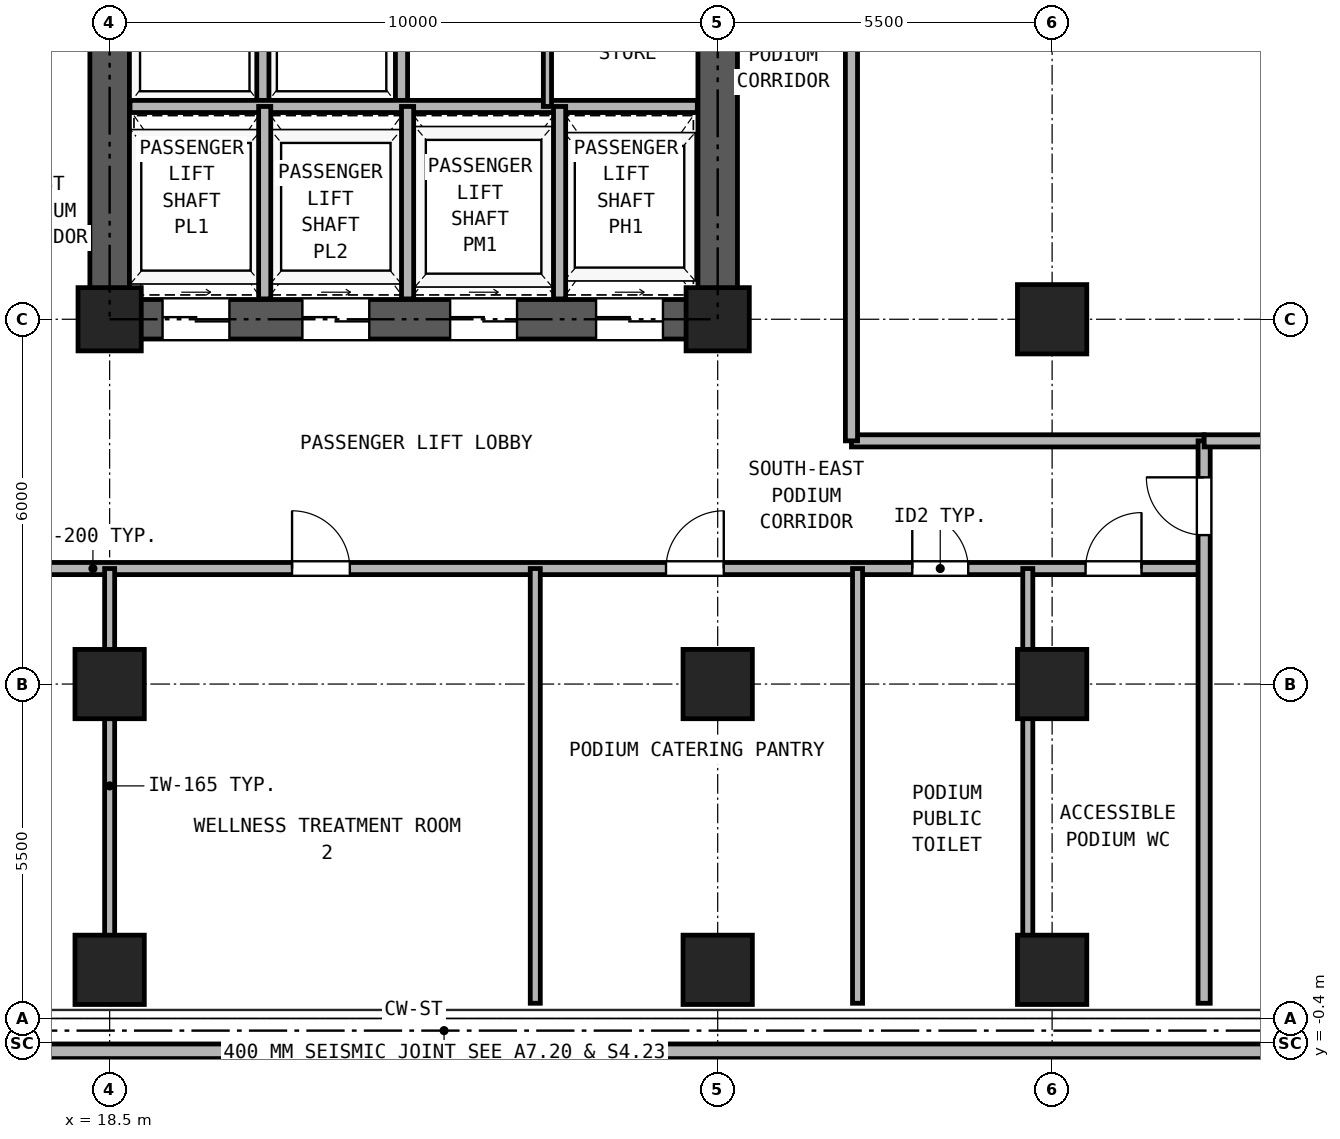
"""IFC4 building model, lengths in metres.
Left out: names, types, materials, properties, quantities, classifications, styles, units other than length and angle.
Written with IfcOpenShell. Run it as: python <this file> out.ifc"""

import sys

from ifc_helpers import new_model, si_unit, direction, frame, frame_2d, origin, origin_2d, place, context, subcontext, project, spatial, rectangle, hollow_rectangle, extrude, source, transform, mapped, element, fill, save


model = new_model("IFC4")
c1 = context("Model", 3, precision=1e-05, world=origin(), true_north=direction((0.0, 1.0)))
c2 = subcontext(c1, "Body", "Model", "MODEL_VIEW")
j1 = project(units=[si_unit("LENGTHUNIT", "METRE"), si_unit("PLANEANGLEUNIT", "RADIAN")], contexts=[c1])
p1 = place(None, origin())
s1 = spatial("IfcSite", under=j1, at=p1, CompositionType="ELEMENT")
p2 = place(p1, origin())
s2 = spatial("IfcBuilding", under=s1, at=p2, CompositionType="ELEMENT")
p3 = place(p2, frame((0.0, 0.0, 13.5)))
s3 = spatial("IfcBuildingStorey", under=s2, at=p3, CompositionType="ELEMENT", Elevation=13.5)
m1 = source(origin(), c2, "Body", "SweptSolid", [
    extrude(hollow_rectangle(XDim=1.14, YDim=1.14, WallThickness=0.07, at=origin_2d()), origin(), (0.0, 0.0, 1.0), 4.18),
])
for number, where, z_axis, x_axis in (
    (1, (18.5, 0.8, 0.0), (0.0, 0.0, 1.0), (1.0, 0.0, 0.0)),
    (2, (28.5, 0.8, 0.0), (0.0, 0.0, 1.0), (1.0, 0.0, 0.0)),
    (3, (34.0, 0.8, 0.0), (0.0, 0.0, 1.0), (1.0, 0.0, 0.0)),
    (4, (18.5, 5.5, 0.0), (0.0, 0.0, 1.0), (1.0, 0.0, 0.0)),
):
    element("IfcColumn", number, at=place(p3, frame(where, z_axis=z_axis, x_axis=x_axis)), inside=s3, PredefinedType="COLUMN", context=c2, shape_type="MappedRepresentation", body=[
        mapped(m1, transform((0.0, 0.0, 0.0), x_axis=(1.0, 0.0, 0.0), y_axis=(0.0, 1.0, 0.0), z_axis=(0.0, 0.0, 1.0), scale=1.0)),
    ])
m2 = source(origin(), c2, "Body", "SweptSolid", [
    extrude(hollow_rectangle(XDim=1.04, YDim=1.04, WallThickness=0.065, at=origin_2d()), origin(), (0.0, 0.0, 1.0), 4.18),
])
p4 = place(p3, frame((18.5, 11.5, 0.0), z_axis=(0.0, 0.0, 1.0), x_axis=(1.0, 0.0, 0.0)))
e5 = element("IfcColumn", 5, at=p4, inside=s3, PredefinedType="COLUMN", context=c2, shape_type="MappedRepresentation", body=[
    mapped(m2, transform((0.0, 0.0, 0.0), x_axis=(1.0, 0.0, 0.0), y_axis=(0.0, 1.0, 0.0), z_axis=(0.0, 0.0, 1.0), scale=1.0)),
])
p5 = place(p3, frame((28.5, 5.5, 0.0), z_axis=(0.0, 0.0, 1.0), x_axis=(1.0, 0.0, 0.0)))
e6 = element("IfcColumn", 6, at=p5, inside=s3, PredefinedType="COLUMN", context=c2, shape_type="MappedRepresentation", body=[
    mapped(m1, transform((0.0, 0.0, 0.0), x_axis=(1.0, 0.0, 0.0), y_axis=(0.0, 1.0, 0.0), z_axis=(0.0, 0.0, 1.0), scale=1.0)),
])
p6 = place(p3, frame((28.5, 11.5, 0.0), z_axis=(0.0, 0.0, 1.0), x_axis=(1.0, 0.0, 0.0)))
e7 = element("IfcColumn", 7, at=p6, inside=s3, PredefinedType="COLUMN", context=c2, shape_type="MappedRepresentation", body=[
    mapped(m2, transform((0.0, 0.0, 0.0), x_axis=(1.0, 0.0, 0.0), y_axis=(0.0, 1.0, 0.0), z_axis=(0.0, 0.0, 1.0), scale=1.0)),
])
for number, where, z_axis, x_axis in (
    (8, (34.0, 5.5, 0.0), (0.0, 0.0, 1.0), (1.0, 0.0, 0.0)),
    (9, (34.0, 11.5, 0.0), (0.0, 0.0, 1.0), (1.0, 0.0, 0.0)),
):
    element("IfcColumn", number, at=place(p3, frame(where, z_axis=z_axis, x_axis=x_axis)), inside=s3, PredefinedType="COLUMN", context=c2, shape_type="MappedRepresentation", body=[
        mapped(m1, transform((0.0, 0.0, 0.0), x_axis=(1.0, 0.0, 0.0), y_axis=(0.0, 1.0, 0.0), z_axis=(0.0, 0.0, 1.0), scale=1.0)),
    ])
p7 = place(p3, frame((0.2, -0.54, 0.0), z_axis=(0.0, 0.0, 1.0), x_axis=(1.0, 0.0, 0.0)))
e10 = element("IfcWall", 10, at=p7, inside=s3, PredefinedType="SOLIDWALL", context=c2, shape_type="SweptSolid", body=[
    extrude(rectangle(XDim=47.34, YDim=0.24, at=frame_2d((23.67, 0.0))), origin(), (0.0, 0.0, 1.0), 4.18),
])
p8 = place(p3, frame((18.175, 11.5, 0.0), z_axis=(0.0, 0.0, 1.0), x_axis=(1.0, 0.0, 0.0)))
e11 = element("IfcWall", 11, at=p8, inside=s3, PredefinedType="SHEAR", context=c2, shape_type="SweptSolid", body=[
    extrude(rectangle(XDim=10.65, YDim=0.65, at=frame_2d((5.325, 0.0))), origin(), (0.0, 0.0, 1.0), 4.18),
])
p9 = place(p8, frame((1.195, 0.0, 0.0)))
e12 = element("IfcOpeningElement", 12, at=p9, cuts=e11, PredefinedType="OPENING", context=c2, shape_type="SweptSolid", body=[
    extrude(rectangle(XDim=1.1, YDim=2.25, at=frame_2d((0.55, 1.125))), frame((0.0, 0.335, 0.0), z_axis=(0.0, -1.0, 0.0), x_axis=(1.0, 0.0, 0.0)), (0.0, 0.0, 1.0), 0.67),
])
p10 = place(p8, frame((3.495, 0.0, 0.0)))
e13 = element("IfcOpeningElement", 13, at=p10, cuts=e11, PredefinedType="OPENING", context=c2, shape_type="SweptSolid", body=[
    extrude(rectangle(XDim=1.1, YDim=2.25, at=frame_2d((0.55, 1.125))), frame((0.0, 0.335, 0.0), z_axis=(0.0, -1.0, 0.0), x_axis=(1.0, 0.0, 0.0)), (0.0, 0.0, 1.0), 0.67),
])
p11 = place(p8, frame((5.925, 0.0, 0.0)))
e14 = element("IfcOpeningElement", 14, at=p11, cuts=e11, PredefinedType="OPENING", context=c2, shape_type="SweptSolid", body=[
    extrude(rectangle(XDim=1.1, YDim=2.25, at=frame_2d((0.55, 1.125))), frame((0.0, 0.335, 0.0), z_axis=(0.0, -1.0, 0.0), x_axis=(1.0, 0.0, 0.0)), (0.0, 0.0, 1.0), 0.67),
])
p12 = place(p8, frame((8.325, 0.0, 0.0)))
e15 = element("IfcOpeningElement", 15, at=p12, cuts=e11, PredefinedType="OPENING", context=c2, shape_type="SweptSolid", body=[
    extrude(rectangle(XDim=1.1, YDim=2.25, at=frame_2d((0.55, 1.125))), frame((0.0, 0.335, 0.0), z_axis=(0.0, -1.0, 0.0), x_axis=(1.0, 0.0, 0.0)), (0.0, 0.0, 1.0), 0.67),
])
p13 = place(p3, frame((18.5, 11.825, 0.0), z_axis=(0.0, 0.0, 1.0), x_axis=(0.0, 1.0, 0.0)))
e16 = element("IfcWall", 16, at=p13, inside=s3, PredefinedType="SHEAR", context=c2, shape_type="SweptSolid", body=[
    extrude(rectangle(XDim=16.6, YDim=0.65, at=frame_2d((8.3, 0.0))), origin(), (0.0, 0.0, 1.0), 4.18),
])
p14 = place(p13, frame((7.325, 0.0, 0.0)))
e17 = element("IfcOpeningElement", 17, at=p14, cuts=e16, PredefinedType="OPENING", context=c2, shape_type="SweptSolid", body=[
    extrude(rectangle(XDim=1.15, YDim=2.2, at=frame_2d((0.575, 1.1))), frame((0.0, 0.335, 0.0), z_axis=(0.0, -1.0, 0.0), x_axis=(1.0, 0.0, 0.0)), (0.0, 0.0, 1.0), 0.67),
])
p15 = place(p3, frame((28.5, 11.825, 0.0), z_axis=(0.0, 0.0, 1.0), x_axis=(0.0, 1.0, 0.0)))
e18 = element("IfcWall", 18, at=p15, inside=s3, PredefinedType="SHEAR", context=c2, shape_type="SweptSolid", body=[
    extrude(rectangle(XDim=16.6, YDim=0.65, at=frame_2d((8.3, 0.0))), origin(), (0.0, 0.0, 1.0), 4.18),
])
p16 = place(p15, frame((7.325, 0.0, 0.0)))
e19 = element("IfcOpeningElement", 19, at=p16, cuts=e18, PredefinedType="OPENING", context=c2, shape_type="SweptSolid", body=[
    extrude(rectangle(XDim=1.15, YDim=2.2, at=frame_2d((0.575, 1.1))), frame((0.0, 0.335, 0.0), z_axis=(0.0, -1.0, 0.0), x_axis=(1.0, 0.0, 0.0)), (0.0, 0.0, 1.0), 0.67),
])
for number, where, z_axis, x_axis in (
    (20, (21.02, 15.0, 0.0), (0.0, 0.0, 1.0), (0.0, 1.0, 0.0)),
    (21, (23.3, 15.0, 0.0), (0.0, 0.0, 1.0), (0.0, 1.0, 0.0)),
):
    element("IfcWall", number, at=place(p3, frame(where, z_axis=z_axis, x_axis=x_axis)), inside=s3, PredefinedType="PARTITIONING", context=c2, shape_type="SweptSolid", body=[
        extrude(rectangle(XDim=3.0, YDim=0.2, at=frame_2d((1.5, 0.0))), origin(), (0.0, 0.0, 1.0), 4.18),
    ])
p17 = place(p3, frame((18.835, 15.0, 0.0), z_axis=(0.0, 0.0, 1.0), x_axis=(1.0, 0.0, 0.0)))
e22 = element("IfcWall", 22, at=p17, inside=s3, PredefinedType="PARTITIONING", context=c2, shape_type="SweptSolid", body=[
    extrude(rectangle(XDim=9.33, YDim=0.2, at=frame_2d((4.665, 0.0))), origin(), (0.0, 0.0, 1.0), 4.18),
])
p18 = place(p3, frame((25.7, 15.0, 0.0), z_axis=(0.0, 0.0, 1.0), x_axis=(0.0, 1.0, 0.0)))
e23 = element("IfcWall", 23, at=p18, inside=s3, PredefinedType="PARTITIONING", context=c2, shape_type="SweptSolid", body=[
    extrude(rectangle(XDim=3.0, YDim=0.135, at=frame_2d((1.5, 0.0))), origin(), (0.0, 0.0, 1.0), 4.18),
])
for number, where, z_axis, x_axis in (
    (24, (21.05, 11.835, 0.0), (0.0, 0.0, 1.0), (0.0, 1.0, 0.0)),
    (25, (23.4, 11.835, 0.0), (0.0, 0.0, 1.0), (0.0, 1.0, 0.0)),
    (26, (25.9, 11.835, 0.0), (0.0, 0.0, 1.0), (0.0, 1.0, 0.0)),
):
    element("IfcWall", number, at=place(p3, frame(where, z_axis=z_axis, x_axis=x_axis)), inside=s3, PredefinedType="PARTITIONING", context=c2, shape_type="SweptSolid", body=[
        extrude(rectangle(XDim=3.165, YDim=0.2, at=frame_2d((1.583, 0.0))), origin(), (0.0, 0.0, 1.0), 4.18),
    ])
p19 = place(p3, frame((10.5, 7.4, 0.0), z_axis=(0.0, 0.0, 1.0), x_axis=(1.0, 0.0, 0.0)))
e27 = element("IfcWall", 27, at=p19, inside=s3, PredefinedType="PARTITIONING", context=c2, shape_type="SweptSolid", body=[
    extrude(rectangle(XDim=26.0, YDim=0.2, at=frame_2d((13.0, 0.0))), origin(), (0.0, 0.0, 1.0), 4.18),
])
p20 = place(p19, frame((3.5, 0.0, 0.0)))
e28 = element("IfcOpeningElement", 28, at=p20, cuts=e27, PredefinedType="OPENING", context=c2, shape_type="SweptSolid", body=[
    extrude(rectangle(XDim=0.95, YDim=2.15, at=frame_2d((0.475, 1.075))), frame((0.0, 0.11, 0.0), z_axis=(0.0, -1.0, 0.0), x_axis=(1.0, 0.0, 0.0)), (0.0, 0.0, 1.0), 0.22),
])
p21 = place(p19, frame((11.0, 0.0, 0.0)))
e29 = element("IfcOpeningElement", 29, at=p21, cuts=e27, PredefinedType="OPENING", context=c2, shape_type="SweptSolid", body=[
    extrude(rectangle(XDim=0.95, YDim=2.15, at=frame_2d((0.475, 1.075))), frame((0.0, 0.11, 0.0), z_axis=(0.0, -1.0, 0.0), x_axis=(1.0, 0.0, 0.0)), (0.0, 0.0, 1.0), 0.22),
])
p22 = place(p19, frame((17.15, 0.0, 0.0)))
e30 = element("IfcOpeningElement", 30, at=p22, cuts=e27, PredefinedType="OPENING", context=c2, shape_type="SweptSolid", body=[
    extrude(rectangle(XDim=0.95, YDim=2.15, at=frame_2d((0.475, 1.075))), frame((0.0, 0.11, 0.0), z_axis=(0.0, -1.0, 0.0), x_axis=(1.0, 0.0, 0.0)), (0.0, 0.0, 1.0), 0.22),
])
p23 = place(p19, frame((21.2, 0.0, 0.0)))
e31 = element("IfcOpeningElement", 31, at=p23, cuts=e27, PredefinedType="OPENING", context=c2, shape_type="SweptSolid", body=[
    extrude(rectangle(XDim=0.92, YDim=2.1, at=frame_2d((0.46, 1.05))), frame((0.0, 0.11, 0.0), z_axis=(0.0, -1.0, 0.0), x_axis=(1.0, 0.0, 0.0)), (0.0, 0.0, 1.0), 0.22),
])
p24 = place(p19, frame((24.05, 0.0, 0.0)))
e32 = element("IfcOpeningElement", 32, at=p24, cuts=e27, PredefinedType="OPENING", context=c2, shape_type="SweptSolid", body=[
    extrude(rectangle(XDim=0.92, YDim=2.1, at=frame_2d((0.46, 1.05))), frame((0.0, 0.11, 0.0), z_axis=(0.0, -1.0, 0.0), x_axis=(1.0, 0.0, 0.0)), (0.0, 0.0, 1.0), 0.22),
])
p25 = place(p3, frame((30.7, 9.5, 0.0), z_axis=(0.0, 0.0, 1.0), x_axis=(1.0, 0.0, 0.0)))
e33 = element("IfcWall", 33, at=p25, inside=s3, PredefinedType="PARTITIONING", context=c2, shape_type="SweptSolid", body=[
    extrude(rectangle(XDim=5.8, YDim=0.2, at=frame_2d((2.9, 0.0))), origin(), (0.0, 0.0, 1.0), 4.18),
])
p26 = place(p3, frame((30.7, 9.5, 0.0), z_axis=(0.0, 0.0, 1.0), x_axis=(0.0, 1.0, 0.0)))
e34 = element("IfcWall", 34, at=p26, inside=s3, PredefinedType="PARTITIONING", context=c2, shape_type="SweptSolid", body=[
    extrude(rectangle(XDim=20.7, YDim=0.2, at=frame_2d((10.35, 0.0))), origin(), (0.0, 0.0, 1.0), 4.18),
])
p27 = place(p26, frame((9.85, 0.0, 0.0)))
e35 = element("IfcOpeningElement", 35, at=p27, cuts=e34, PredefinedType="OPENING", context=c2, shape_type="SweptSolid", body=[
    extrude(rectangle(XDim=0.95, YDim=2.15, at=frame_2d((0.475, 1.075))), frame((0.0, 0.11, 0.0), z_axis=(0.0, -1.0, 0.0), x_axis=(1.0, 0.0, 0.0)), (0.0, 0.0, 1.0), 0.22),
])
p28 = place(p3, frame((36.5, 0.25, 0.0), z_axis=(0.0, 0.0, 1.0), x_axis=(0.0, 1.0, 0.0)))
e36 = element("IfcWall", 36, at=p28, inside=s3, PredefinedType="PARTITIONING", context=c2, shape_type="SweptSolid", body=[
    extrude(rectangle(XDim=9.25, YDim=0.2, at=frame_2d((4.625, 0.0))), origin(), (0.0, 0.0, 1.0), 4.18),
])
p29 = place(p28, frame((7.7, 0.0, 0.0)))
e37 = element("IfcOpeningElement", 37, at=p29, cuts=e36, PredefinedType="OPENING", context=c2, shape_type="SweptSolid", body=[
    extrude(rectangle(XDim=0.95, YDim=2.15, at=frame_2d((0.475, 1.075))), frame((0.0, 0.11, 0.0), z_axis=(0.0, -1.0, 0.0), x_axis=(1.0, 0.0, 0.0)), (0.0, 0.0, 1.0), 0.22),
])
p30 = place(p3, frame((36.5, 9.5, 0.0), z_axis=(0.0, 0.0, 1.0), x_axis=(1.0, 0.0, 0.0)))
e38 = element("IfcWall", 38, at=p30, inside=s3, PredefinedType="PARTITIONING", context=c2, shape_type="SweptSolid", body=[
    extrude(rectangle(XDim=10.25, YDim=0.2, at=frame_2d((5.125, 0.0))), origin(), (0.0, 0.0, 1.0), 4.18),
])
p31 = place(p3, frame((18.5, 0.25, 0.0), z_axis=(0.0, 0.0, 1.0), x_axis=(0.0, 1.0, 0.0)))
e39 = element("IfcWall", 39, at=p31, inside=s3, PredefinedType="PARTITIONING", context=c2, shape_type="SweptSolid", body=[
    extrude(rectangle(XDim=7.15, YDim=0.165, at=frame_2d((3.575, 0.0))), origin(), (0.0, 0.0, 1.0), 3.253),
])
for number, where, z_axis, x_axis in (
    (40, (25.5, 0.25, 0.0), (0.0, 0.0, 1.0), (0.0, 1.0, 0.0)),
    (41, (30.8, 0.25, 0.0), (0.0, 0.0, 1.0), (0.0, 1.0, 0.0)),
    (42, (33.6, 0.25, 0.0), (0.0, 0.0, 1.0), (0.0, 1.0, 0.0)),
):
    element("IfcWall", number, at=place(p3, frame(where, z_axis=z_axis, x_axis=x_axis)), inside=s3, PredefinedType="PARTITIONING", context=c2, shape_type="SweptSolid", body=[
        extrude(rectangle(XDim=7.15, YDim=0.165, at=frame_2d((3.575, 0.0))), origin(), (0.0, 0.0, 1.0), 4.18),
    ])
p32 = place(p9, frame((1.1, 0.0, 0.0), z_axis=(0.0, 0.0, 1.0), x_axis=(-1.0, 0.0, 0.0)))
e43 = element("IfcDoor", 43, at=p32, inside=s3, OperationType="DOUBLE_DOOR_SLIDING", PredefinedType="DOOR", context=c2, shape_type="SweptSolid", body=[
    extrude(rectangle(XDim=1.1, YDim=2.25, at=frame_2d((0.55, 1.125))), frame((0.0, 0.025, 0.0), z_axis=(0.0, -1.0, 0.0), x_axis=(1.0, 0.0, 0.0)), (0.0, 0.0, 1.0), 0.05),
])
fill(e12, e43)
p33 = place(p10, frame((1.1, 0.0, 0.0), z_axis=(0.0, 0.0, 1.0), x_axis=(-1.0, 0.0, 0.0)))
e44 = element("IfcDoor", 44, at=p33, inside=s3, OperationType="DOUBLE_DOOR_SLIDING", PredefinedType="DOOR", context=c2, shape_type="SweptSolid", body=[
    extrude(rectangle(XDim=1.1, YDim=2.25, at=frame_2d((0.55, 1.125))), frame((0.0, 0.025, 0.0), z_axis=(0.0, -1.0, 0.0), x_axis=(1.0, 0.0, 0.0)), (0.0, 0.0, 1.0), 0.05),
])
fill(e13, e44)
p34 = place(p11, frame((1.1, 0.0, 0.0), z_axis=(0.0, 0.0, 1.0), x_axis=(-1.0, 0.0, 0.0)))
e45 = element("IfcDoor", 45, at=p34, inside=s3, OperationType="DOUBLE_DOOR_SLIDING", PredefinedType="DOOR", context=c2, shape_type="SweptSolid", body=[
    extrude(rectangle(XDim=1.1, YDim=2.25, at=frame_2d((0.55, 1.125))), frame((0.0, 0.025, 0.0), z_axis=(0.0, -1.0, 0.0), x_axis=(1.0, 0.0, 0.0)), (0.0, 0.0, 1.0), 0.05),
])
fill(e14, e45)
p35 = place(p12, frame((1.1, 0.0, 0.0), z_axis=(0.0, 0.0, 1.0), x_axis=(-1.0, 0.0, 0.0)))
e46 = element("IfcDoor", 46, at=p35, inside=s3, OperationType="DOUBLE_DOOR_SLIDING", PredefinedType="DOOR", context=c2, shape_type="SweptSolid", body=[
    extrude(rectangle(XDim=1.1, YDim=2.25, at=frame_2d((0.55, 1.125))), frame((0.0, 0.025, 0.0), z_axis=(0.0, -1.0, 0.0), x_axis=(1.0, 0.0, 0.0)), (0.0, 0.0, 1.0), 0.05),
])
fill(e15, e46)
p36 = place(p21, frame((0.95, 0.0, 0.0), z_axis=(0.0, 0.0, 1.0), x_axis=(-1.0, 0.0, 0.0)))
e47 = element("IfcDoor", 47, at=p36, inside=s3, OperationType="SINGLE_SWING_LEFT", PredefinedType="DOOR", context=c2, shape_type="SweptSolid", body=[
    extrude(rectangle(XDim=0.95, YDim=2.15, at=frame_2d((0.475, 1.075))), frame((0.0, 0.025, 0.0), z_axis=(0.0, -1.0, 0.0), x_axis=(1.0, 0.0, 0.0)), (0.0, 0.0, 1.0), 0.05),
])
fill(e29, e47)
p37 = place(p22, frame((0.95, 0.0, 0.0), z_axis=(0.0, 0.0, 1.0), x_axis=(-1.0, 0.0, 0.0)))
e48 = element("IfcDoor", 48, at=p37, inside=s3, OperationType="SINGLE_SWING_RIGHT", PredefinedType="DOOR", context=c2, shape_type="SweptSolid", body=[
    extrude(rectangle(XDim=0.95, YDim=2.15, at=frame_2d((0.475, 1.075))), frame((0.0, 0.025, 0.0), z_axis=(0.0, -1.0, 0.0), x_axis=(1.0, 0.0, 0.0)), (0.0, 0.0, 1.0), 0.05),
])
fill(e30, e48)
p38 = place(p23, frame((0.92, 0.0, 0.0), z_axis=(0.0, 0.0, 1.0), x_axis=(-1.0, 0.0, 0.0)))
e49 = element("IfcDoor", 49, at=p38, inside=s3, OperationType="SINGLE_SWING_LEFT", PredefinedType="DOOR", context=c2, shape_type="SweptSolid", body=[
    extrude(rectangle(XDim=0.92, YDim=2.1, at=frame_2d((0.46, 1.05))), frame((0.0, 0.025, 0.0), z_axis=(0.0, -1.0, 0.0), x_axis=(1.0, 0.0, 0.0)), (0.0, 0.0, 1.0), 0.05),
])
fill(e31, e49)
p39 = place(p24, frame((0.92, 0.0, 0.0), z_axis=(0.0, 0.0, 1.0), x_axis=(-1.0, 0.0, 0.0)))
e50 = element("IfcDoor", 50, at=p39, inside=s3, OperationType="SINGLE_SWING_RIGHT", PredefinedType="DOOR", context=c2, shape_type="SweptSolid", body=[
    extrude(rectangle(XDim=0.92, YDim=2.1, at=frame_2d((0.46, 1.05))), frame((0.0, 0.025, 0.0), z_axis=(0.0, -1.0, 0.0), x_axis=(1.0, 0.0, 0.0)), (0.0, 0.0, 1.0), 0.05),
])
fill(e32, e50)
p40 = place(p29, origin())
e51 = element("IfcDoor", 51, at=p40, inside=s3, OperationType="SINGLE_SWING_RIGHT", PredefinedType="DOOR", context=c2, shape_type="SweptSolid", body=[
    extrude(rectangle(XDim=0.95, YDim=2.15, at=frame_2d((0.475, 1.075))), frame((0.0, 0.025, 0.0), z_axis=(0.0, -1.0, 0.0), x_axis=(1.0, 0.0, 0.0)), (0.0, 0.0, 1.0), 0.05),
])
fill(e37, e51)
save(model, sys.argv[1])
